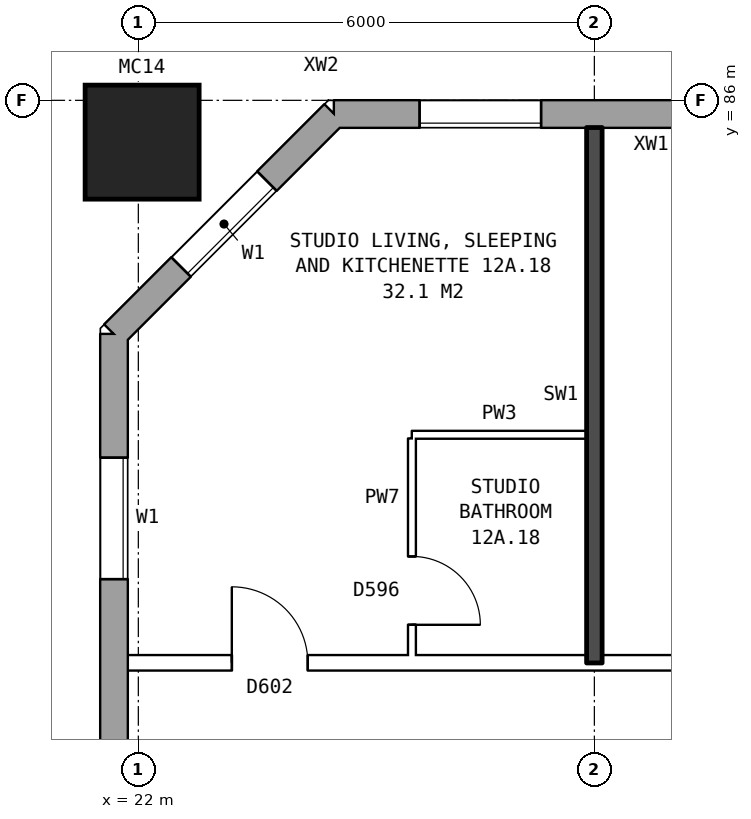
"""IFC4 building model, lengths in metres.
Left out: names, types, materials, properties, quantities, classifications, styles, units other than length and angle.
Written with IfcOpenShell. Run it as: python <this file> out.ifc"""

import sys

from ifc_helpers import new_model, si_unit, direction, frame, frame_2d, origin, origin_2d, place, context, subcontext, project, spatial, rectangle, hollow_rectangle, extrude, element, fill, save


model = new_model("IFC4")
c1 = context("Model", 3, precision=1e-05, world=origin(), true_north=direction((0.0, 1.0)))
c2 = subcontext(c1, "Body", "Model", "MODEL_VIEW")
j1 = project(units=[si_unit("LENGTHUNIT", "METRE"), si_unit("PLANEANGLEUNIT", "RADIAN")], contexts=[c1])
p1 = place(None, origin())
s1 = spatial("IfcSite", under=j1, at=p1, CompositionType="ELEMENT")
p2 = place(p1, origin())
s2 = spatial("IfcBuilding", under=s1, at=p2, CompositionType="ELEMENT")
p3 = place(p2, frame((0.0, 0.0, 47.4)))
s3 = spatial("IfcBuildingStorey", under=s2, at=p3, CompositionType="ELEMENT", Elevation=47.4)
p4 = place(p3, frame((22.05, 85.45, 0.0), z_axis=(0.0, 0.0, 1.0), x_axis=(1.0, 0.0, 0.0)))
e1 = element("IfcColumn", 1, at=p4, inside=s3, PredefinedType="COLUMN", context=c2, shape_type="SweptSolid", body=[
    extrude(hollow_rectangle(XDim=1.5, YDim=1.5, WallThickness=0.08, at=origin_2d()), origin(), (0.0, 0.0, 1.0), 3.1),
])
p5 = place(p3, frame((72.925, 85.82, 0.0), z_axis=(0.0, 0.0, 1.0), x_axis=(-1.0, 0.0, 0.0)))
e2 = element("IfcWall", 2, at=p5, inside=s3, PredefinedType="STANDARD", context=c2, shape_type="SweptSolid", body=[
    extrude(rectangle(XDim=48.351, YDim=0.36, at=frame_2d((24.175, 0.0))), origin(), (0.0, 0.0, 1.0), 2.85),
])
p6 = place(p5, frame((0.625, 0.0, 0.8)))
e3 = element("IfcOpeningElement", 3, at=p6, cuts=e2, PredefinedType="OPENING", context=c2, shape_type="SweptSolid", body=[
    extrude(rectangle(XDim=1.6, YDim=1.8, at=frame_2d((0.8, 0.9))), frame((0.0, 0.19, 0.0), z_axis=(0.0, -1.0, 0.0), x_axis=(1.0, 0.0, 0.0)), (0.0, 0.0, 1.0), 0.38),
])
p7 = place(p5, frame((3.125, 0.0, 1.7)))
e4 = element("IfcOpeningElement", 4, at=p7, cuts=e2, PredefinedType="OPENING", context=c2, shape_type="SweptSolid", body=[
    extrude(rectangle(XDim=0.6, YDim=0.9, at=frame_2d((0.3, 0.45))), frame((0.0, 0.19, 0.0), z_axis=(0.0, -1.0, 0.0), x_axis=(1.0, 0.0, 0.0)), (0.0, 0.0, 1.0), 0.38),
])
p8 = place(p5, frame((6.625, 0.0, 0.8)))
e5 = element("IfcOpeningElement", 5, at=p8, cuts=e2, PredefinedType="OPENING", context=c2, shape_type="SweptSolid", body=[
    extrude(rectangle(XDim=1.6, YDim=1.8, at=frame_2d((0.8, 0.9))), frame((0.0, 0.19, 0.0), z_axis=(0.0, -1.0, 0.0), x_axis=(1.0, 0.0, 0.0)), (0.0, 0.0, 1.0), 0.38),
])
p9 = place(p5, frame((9.625, 0.0, 0.8)))
e6 = element("IfcOpeningElement", 6, at=p9, cuts=e2, PredefinedType="OPENING", context=c2, shape_type="SweptSolid", body=[
    extrude(rectangle(XDim=1.6, YDim=1.8, at=frame_2d((0.8, 0.9))), frame((0.0, 0.19, 0.0), z_axis=(0.0, -1.0, 0.0), x_axis=(1.0, 0.0, 0.0)), (0.0, 0.0, 1.0), 0.38),
])
p10 = place(p5, frame((12.625, 0.0, 0.8)))
e7 = element("IfcOpeningElement", 7, at=p10, cuts=e2, PredefinedType="OPENING", context=c2, shape_type="SweptSolid", body=[
    extrude(rectangle(XDim=1.6, YDim=1.8, at=frame_2d((0.8, 0.9))), frame((0.0, 0.19, 0.0), z_axis=(0.0, -1.0, 0.0), x_axis=(1.0, 0.0, 0.0)), (0.0, 0.0, 1.0), 0.38),
])
p11 = place(p5, frame((15.625, 0.0, 0.8)))
e8 = element("IfcOpeningElement", 8, at=p11, cuts=e2, PredefinedType="OPENING", context=c2, shape_type="SweptSolid", body=[
    extrude(rectangle(XDim=1.6, YDim=1.8, at=frame_2d((0.8, 0.9))), frame((0.0, 0.19, 0.0), z_axis=(0.0, -1.0, 0.0), x_axis=(1.0, 0.0, 0.0)), (0.0, 0.0, 1.0), 0.38),
])
p12 = place(p5, frame((18.625, 0.0, 0.8)))
e9 = element("IfcOpeningElement", 9, at=p12, cuts=e2, PredefinedType="OPENING", context=c2, shape_type="SweptSolid", body=[
    extrude(rectangle(XDim=1.6, YDim=1.8, at=frame_2d((0.8, 0.9))), frame((0.0, 0.19, 0.0), z_axis=(0.0, -1.0, 0.0), x_axis=(1.0, 0.0, 0.0)), (0.0, 0.0, 1.0), 0.38),
])
p13 = place(p5, frame((21.625, 0.0, 0.8)))
e10 = element("IfcOpeningElement", 10, at=p13, cuts=e2, PredefinedType="OPENING", context=c2, shape_type="SweptSolid", body=[
    extrude(rectangle(XDim=1.6, YDim=1.8, at=frame_2d((0.8, 0.9))), frame((0.0, 0.19, 0.0), z_axis=(0.0, -1.0, 0.0), x_axis=(1.0, 0.0, 0.0)), (0.0, 0.0, 1.0), 0.38),
])
p14 = place(p5, frame((24.625, 0.0, 0.8)))
e11 = element("IfcOpeningElement", 11, at=p14, cuts=e2, PredefinedType="OPENING", context=c2, shape_type="SweptSolid", body=[
    extrude(rectangle(XDim=1.6, YDim=1.8, at=frame_2d((0.8, 0.9))), frame((0.0, 0.19, 0.0), z_axis=(0.0, -1.0, 0.0), x_axis=(1.0, 0.0, 0.0)), (0.0, 0.0, 1.0), 0.38),
])
p15 = place(p5, frame((27.625, 0.0, 0.8)))
e12 = element("IfcOpeningElement", 12, at=p15, cuts=e2, PredefinedType="OPENING", context=c2, shape_type="SweptSolid", body=[
    extrude(rectangle(XDim=1.6, YDim=1.8, at=frame_2d((0.8, 0.9))), frame((0.0, 0.19, 0.0), z_axis=(0.0, -1.0, 0.0), x_axis=(1.0, 0.0, 0.0)), (0.0, 0.0, 1.0), 0.38),
])
p16 = place(p5, frame((30.625, 0.0, 0.8)))
e13 = element("IfcOpeningElement", 13, at=p16, cuts=e2, PredefinedType="OPENING", context=c2, shape_type="SweptSolid", body=[
    extrude(rectangle(XDim=1.6, YDim=1.8, at=frame_2d((0.8, 0.9))), frame((0.0, 0.19, 0.0), z_axis=(0.0, -1.0, 0.0), x_axis=(1.0, 0.0, 0.0)), (0.0, 0.0, 1.0), 0.38),
])
p17 = place(p5, frame((33.625, 0.0, 0.8)))
e14 = element("IfcOpeningElement", 14, at=p17, cuts=e2, PredefinedType="OPENING", context=c2, shape_type="SweptSolid", body=[
    extrude(rectangle(XDim=1.6, YDim=1.8, at=frame_2d((0.8, 0.9))), frame((0.0, 0.19, 0.0), z_axis=(0.0, -1.0, 0.0), x_axis=(1.0, 0.0, 0.0)), (0.0, 0.0, 1.0), 0.38),
])
p18 = place(p5, frame((36.625, 0.0, 0.8)))
e15 = element("IfcOpeningElement", 15, at=p18, cuts=e2, PredefinedType="OPENING", context=c2, shape_type="SweptSolid", body=[
    extrude(rectangle(XDim=1.6, YDim=1.8, at=frame_2d((0.8, 0.9))), frame((0.0, 0.19, 0.0), z_axis=(0.0, -1.0, 0.0), x_axis=(1.0, 0.0, 0.0)), (0.0, 0.0, 1.0), 0.38),
])
p19 = place(p5, frame((39.625, 0.0, 0.8)))
e16 = element("IfcOpeningElement", 16, at=p19, cuts=e2, PredefinedType="OPENING", context=c2, shape_type="SweptSolid", body=[
    extrude(rectangle(XDim=1.6, YDim=1.8, at=frame_2d((0.8, 0.9))), frame((0.0, 0.19, 0.0), z_axis=(0.0, -1.0, 0.0), x_axis=(1.0, 0.0, 0.0)), (0.0, 0.0, 1.0), 0.38),
])
p20 = place(p5, frame((41.525, 0.0, 0.8)))
e17 = element("IfcOpeningElement", 17, at=p20, cuts=e2, PredefinedType="OPENING", context=c2, shape_type="SweptSolid", body=[
    extrude(rectangle(XDim=1.2, YDim=1.2, at=frame_2d((0.6, 0.6))), frame((0.0, 0.19, 0.0), z_axis=(0.0, -1.0, 0.0), x_axis=(1.0, 0.0, 0.0)), (0.0, 0.0, 1.0), 0.38),
])
p21 = place(p5, frame((45.625, 0.0, 0.8)))
e18 = element("IfcOpeningElement", 18, at=p21, cuts=e2, PredefinedType="OPENING", context=c2, shape_type="SweptSolid", body=[
    extrude(rectangle(XDim=1.6, YDim=1.8, at=frame_2d((0.8, 0.9))), frame((0.0, 0.19, 0.0), z_axis=(0.0, -1.0, 0.0), x_axis=(1.0, 0.0, 0.0)), (0.0, 0.0, 1.0), 0.38),
])
p22 = place(p5, frame((5.225, 0.0, 0.8)))
e19 = element("IfcOpeningElement", 19, at=p22, cuts=e2, PredefinedType="OPENING", context=c2, shape_type="SweptSolid", body=[
    extrude(rectangle(XDim=1.0, YDim=0.9, at=frame_2d((0.5, 0.45))), frame((0.0, 0.19, 0.0), z_axis=(0.0, -1.0, 0.0), x_axis=(1.0, 0.0, 0.0)), (0.0, 0.0, 1.0), 0.38),
])
p23 = place(p3, frame((24.575, 85.82, 0.0), z_axis=(0.0, 0.0, 1.0), x_axis=(-0.707106781187, -0.707106781187, 0.0)))
e20 = element("IfcWall", 20, at=p23, inside=s3, PredefinedType="STANDARD", context=c2, shape_type="SweptSolid", body=[
    extrude(rectangle(XDim=4.094, YDim=0.36, at=frame_2d((2.047, 0.0))), origin(), (0.0, 0.0, 1.0), 2.85),
])
p24 = place(p23, frame((1.247, 0.0, 0.8)))
e21 = element("IfcOpeningElement", 21, at=p24, cuts=e20, PredefinedType="OPENING", context=c2, shape_type="SweptSolid", body=[
    extrude(rectangle(XDim=1.6, YDim=1.8, at=frame_2d((0.8, 0.9))), frame((0.0, 0.19, 0.0), z_axis=(0.0, -1.0, 0.0), x_axis=(1.0, 0.0, 0.0)), (0.0, 0.0, 1.0), 0.38),
])
p25 = place(p3, frame((21.68, 82.925, 0.0), z_axis=(0.0, 0.0, 1.0), x_axis=(0.0, -1.0, 0.0)))
e22 = element("IfcWall", 22, at=p25, inside=s3, PredefinedType="STANDARD", context=c2, shape_type="SweptSolid", body=[
    extrude(rectangle(XDim=25.851, YDim=0.36, at=frame_2d((12.925, 0.0))), origin(), (0.0, 0.0, 1.0), 2.85),
])
p26 = place(p25, frame((1.625, 0.0, 0.8)))
e23 = element("IfcOpeningElement", 23, at=p26, cuts=e22, PredefinedType="OPENING", context=c2, shape_type="SweptSolid", body=[
    extrude(rectangle(XDim=1.6, YDim=1.8, at=frame_2d((0.8, 0.9))), frame((0.0, 0.19, 0.0), z_axis=(0.0, -1.0, 0.0), x_axis=(1.0, 0.0, 0.0)), (0.0, 0.0, 1.0), 0.38),
])
p27 = place(p25, frame((6.225, 0.0, 0.8)))
e24 = element("IfcOpeningElement", 24, at=p27, cuts=e22, PredefinedType="OPENING", context=c2, shape_type="SweptSolid", body=[
    extrude(rectangle(XDim=1.0, YDim=0.9, at=frame_2d((0.5, 0.45))), frame((0.0, 0.19, 0.0), z_axis=(0.0, -1.0, 0.0), x_axis=(1.0, 0.0, 0.0)), (0.0, 0.0, 1.0), 0.38),
])
p28 = place(p25, frame((7.625, 0.0, 0.8)))
e25 = element("IfcOpeningElement", 25, at=p28, cuts=e22, PredefinedType="OPENING", context=c2, shape_type="SweptSolid", body=[
    extrude(rectangle(XDim=1.6, YDim=1.8, at=frame_2d((0.8, 0.9))), frame((0.0, 0.19, 0.0), z_axis=(0.0, -1.0, 0.0), x_axis=(1.0, 0.0, 0.0)), (0.0, 0.0, 1.0), 0.38),
])
p29 = place(p25, frame((10.625, 0.0, 0.8)))
e26 = element("IfcOpeningElement", 26, at=p29, cuts=e22, PredefinedType="OPENING", context=c2, shape_type="SweptSolid", body=[
    extrude(rectangle(XDim=1.6, YDim=1.8, at=frame_2d((0.8, 0.9))), frame((0.0, 0.19, 0.0), z_axis=(0.0, -1.0, 0.0), x_axis=(1.0, 0.0, 0.0)), (0.0, 0.0, 1.0), 0.38),
])
p30 = place(p25, frame((13.625, 0.0, 0.8)))
e27 = element("IfcOpeningElement", 27, at=p30, cuts=e22, PredefinedType="OPENING", context=c2, shape_type="SweptSolid", body=[
    extrude(rectangle(XDim=1.6, YDim=1.8, at=frame_2d((0.8, 0.9))), frame((0.0, 0.19, 0.0), z_axis=(0.0, -1.0, 0.0), x_axis=(1.0, 0.0, 0.0)), (0.0, 0.0, 1.0), 0.38),
])
p31 = place(p25, frame((16.625, 0.0, 0.8)))
e28 = element("IfcOpeningElement", 28, at=p31, cuts=e22, PredefinedType="OPENING", context=c2, shape_type="SweptSolid", body=[
    extrude(rectangle(XDim=1.6, YDim=1.8, at=frame_2d((0.8, 0.9))), frame((0.0, 0.19, 0.0), z_axis=(0.0, -1.0, 0.0), x_axis=(1.0, 0.0, 0.0)), (0.0, 0.0, 1.0), 0.38),
])
p32 = place(p25, frame((9.525, 0.0, 0.8)))
e29 = element("IfcOpeningElement", 29, at=p32, cuts=e22, PredefinedType="OPENING", context=c2, shape_type="SweptSolid", body=[
    extrude(rectangle(XDim=0.8, YDim=1.8, at=frame_2d((0.4, 0.9))), frame((0.0, 0.19, 0.0), z_axis=(0.0, -1.0, 0.0), x_axis=(1.0, 0.0, 0.0)), (0.0, 0.0, 1.0), 0.38),
])
p33 = place(p25, frame((22.625, 0.0, 0.8)))
e30 = element("IfcOpeningElement", 30, at=p33, cuts=e22, PredefinedType="OPENING", context=c2, shape_type="SweptSolid", body=[
    extrude(rectangle(XDim=1.6, YDim=1.8, at=frame_2d((0.8, 0.9))), frame((0.0, 0.19, 0.0), z_axis=(0.0, -1.0, 0.0), x_axis=(1.0, 0.0, 0.0)), (0.0, 0.0, 1.0), 0.38),
])
p34 = place(p25, frame((12.525, 0.0, 0.8)))
e31 = element("IfcOpeningElement", 31, at=p34, cuts=e22, PredefinedType="OPENING", context=c2, shape_type="SweptSolid", body=[
    extrude(rectangle(XDim=0.8, YDim=1.8, at=frame_2d((0.4, 0.9))), frame((0.0, 0.19, 0.0), z_axis=(0.0, -1.0, 0.0), x_axis=(1.0, 0.0, 0.0)), (0.0, 0.0, 1.0), 0.38),
])
p35 = place(p25, frame((15.525, 0.0, 0.8)))
e32 = element("IfcOpeningElement", 32, at=p35, cuts=e22, PredefinedType="OPENING", context=c2, shape_type="SweptSolid", body=[
    extrude(rectangle(XDim=0.8, YDim=1.8, at=frame_2d((0.4, 0.9))), frame((0.0, 0.19, 0.0), z_axis=(0.0, -1.0, 0.0), x_axis=(1.0, 0.0, 0.0)), (0.0, 0.0, 1.0), 0.38),
])
p36 = place(p25, frame((18.525, 0.0, 0.8)))
e33 = element("IfcOpeningElement", 33, at=p36, cuts=e22, PredefinedType="OPENING", context=c2, shape_type="SweptSolid", body=[
    extrude(rectangle(XDim=1.0, YDim=0.9, at=frame_2d((0.5, 0.45))), frame((0.0, 0.19, 0.0), z_axis=(0.0, -1.0, 0.0), x_axis=(1.0, 0.0, 0.0)), (0.0, 0.0, 1.0), 0.38),
])
p37 = place(p3, frame((21.86, 78.6, 0.0), z_axis=(0.0, 0.0, 1.0), x_axis=(1.0, 0.0, 0.0)))
e34 = element("IfcWall", 34, at=p37, inside=s3, PredefinedType="PARTITIONING", context=c2, shape_type="SweptSolid", body=[
    extrude(rectangle(XDim=24.04, YDim=0.2, at=frame_2d((12.02, 0.0))), origin(), (0.0, 0.0, 1.0), 2.85),
])
p38 = place(p37, frame((20.59, 0.0, 0.0)))
e35 = element("IfcOpeningElement", 35, at=p38, cuts=e34, PredefinedType="OPENING", context=c2, shape_type="SweptSolid", body=[
    extrude(rectangle(XDim=1.0, YDim=2.1, at=frame_2d((0.5, 1.05))), frame((0.0, 0.11, 0.0), z_axis=(0.0, -1.0, 0.0), x_axis=(1.0, 0.0, 0.0)), (0.0, 0.0, 1.0), 0.22),
])
p39 = place(p37, frame((8.64, 0.0, 0.0)))
e36 = element("IfcOpeningElement", 36, at=p39, cuts=e34, PredefinedType="OPENING", context=c2, shape_type="SweptSolid", body=[
    extrude(rectangle(XDim=1.0, YDim=2.1, at=frame_2d((0.5, 1.05))), frame((0.0, 0.11, 0.0), z_axis=(0.0, -1.0, 0.0), x_axis=(1.0, 0.0, 0.0)), (0.0, 0.0, 1.0), 0.22),
])
p40 = place(p37, frame((1.37, 0.0, 0.0)))
e37 = element("IfcOpeningElement", 37, at=p40, cuts=e34, PredefinedType="OPENING", context=c2, shape_type="SweptSolid", body=[
    extrude(rectangle(XDim=1.0, YDim=2.1, at=frame_2d((0.5, 1.05))), frame((0.0, 0.11, 0.0), z_axis=(0.0, -1.0, 0.0), x_axis=(1.0, 0.0, 0.0)), (0.0, 0.0, 1.0), 0.22),
])
p41 = place(p3, frame((25.6, 81.6, 0.0), z_axis=(0.0, 0.0, 1.0), x_axis=(1.0, 0.0, 0.0)))
e38 = element("IfcWall", 38, at=p41, inside=s3, PredefinedType="PARTITIONING", context=c2, shape_type="SweptSolid", body=[
    extrude(rectangle(XDim=2.3, YDim=0.1, at=frame_2d((1.15, 0.0))), origin(), (0.0, 0.0, 1.0), 2.85),
])
p42 = place(p3, frame((25.6, 78.7, 0.0), z_axis=(0.0, 0.0, 1.0), x_axis=(0.0, 1.0, 0.0)))
e39 = element("IfcWall", 39, at=p42, inside=s3, PredefinedType="PARTITIONING", context=c2, shape_type="SweptSolid", body=[
    extrude(rectangle(XDim=2.85, YDim=0.1, at=frame_2d((1.425, 0.0))), origin(), (0.0, 0.0, 1.0), 2.85),
])
p43 = place(p42, frame((0.4, 0.0, 0.0)))
e40 = element("IfcOpeningElement", 40, at=p43, cuts=e39, PredefinedType="OPENING", context=c2, shape_type="SweptSolid", body=[
    extrude(rectangle(XDim=0.9, YDim=2.1, at=frame_2d((0.45, 1.05))), frame((0.0, 0.06, 0.0), z_axis=(0.0, -1.0, 0.0), x_axis=(1.0, 0.0, 0.0)), (0.0, 0.0, 1.0), 0.12),
])
p44 = place(p3, frame((28.0, 78.6, 0.0), z_axis=(0.0, 0.0, 1.0), x_axis=(0.0, 1.0, 0.0)))
e41 = element("IfcWall", 41, at=p44, inside=s3, PredefinedType="SOLIDWALL", context=c2, shape_type="SweptSolid", body=[
    extrude(rectangle(XDim=7.04, YDim=0.2, at=frame_2d((3.52, 0.0))), origin(), (0.0, 0.0, 1.0), 2.85),
])
p45 = place(p21, origin())
e42 = element("IfcWindow", 42, at=p45, inside=s3, PartitioningType="SINGLE_PANEL", PredefinedType="WINDOW", context=c2, shape_type="SweptSolid", body=[
    extrude(rectangle(XDim=1.6, YDim=1.8, at=frame_2d((0.8, 0.9))), frame((0.0, 0.15, 0.0), z_axis=(0.0, -1.0, 0.0), x_axis=(1.0, 0.0, 0.0)), (0.0, 0.0, 1.0), 0.06),
])
fill(e18, e42)
p46 = place(p24, origin())
e43 = element("IfcWindow", 43, at=p46, inside=s3, PartitioningType="SINGLE_PANEL", PredefinedType="WINDOW", context=c2, shape_type="SweptSolid", body=[
    extrude(rectangle(XDim=1.6, YDim=1.8, at=frame_2d((0.8, 0.9))), frame((0.0, 0.15, 0.0), z_axis=(0.0, -1.0, 0.0), x_axis=(1.0, 0.0, 0.0)), (0.0, 0.0, 1.0), 0.06),
])
fill(e21, e43)
p47 = place(p26, origin())
e44 = element("IfcWindow", 44, at=p47, inside=s3, PartitioningType="SINGLE_PANEL", PredefinedType="WINDOW", context=c2, shape_type="SweptSolid", body=[
    extrude(rectangle(XDim=1.6, YDim=1.8, at=frame_2d((0.8, 0.9))), frame((0.0, 0.15, 0.0), z_axis=(0.0, -1.0, 0.0), x_axis=(1.0, 0.0, 0.0)), (0.0, 0.0, 1.0), 0.06),
])
fill(e23, e44)
p48 = place(p40, origin())
e45 = element("IfcDoor", 45, at=p48, inside=s3, OperationType="SINGLE_SWING_LEFT", PredefinedType="DOOR", context=c2, shape_type="SweptSolid", body=[
    extrude(rectangle(XDim=1.0, YDim=2.1, at=frame_2d((0.5, 1.05))), frame((0.0, 0.025, 0.0), z_axis=(0.0, -1.0, 0.0), x_axis=(1.0, 0.0, 0.0)), (0.0, 0.0, 1.0), 0.05),
])
fill(e37, e45)
p49 = place(p43, frame((0.9, 0.0, 0.0), z_axis=(0.0, 0.0, 1.0), x_axis=(-1.0, 0.0, 0.0)))
e46 = element("IfcDoor", 46, at=p49, inside=s3, OperationType="SINGLE_SWING_RIGHT", PredefinedType="DOOR", context=c2, shape_type="SweptSolid", body=[
    extrude(rectangle(XDim=0.9, YDim=2.1, at=frame_2d((0.45, 1.05))), frame((0.0, 0.025, 0.0), z_axis=(0.0, -1.0, 0.0), x_axis=(1.0, 0.0, 0.0)), (0.0, 0.0, 1.0), 0.05),
])
fill(e40, e46)
save(model, sys.argv[1])
